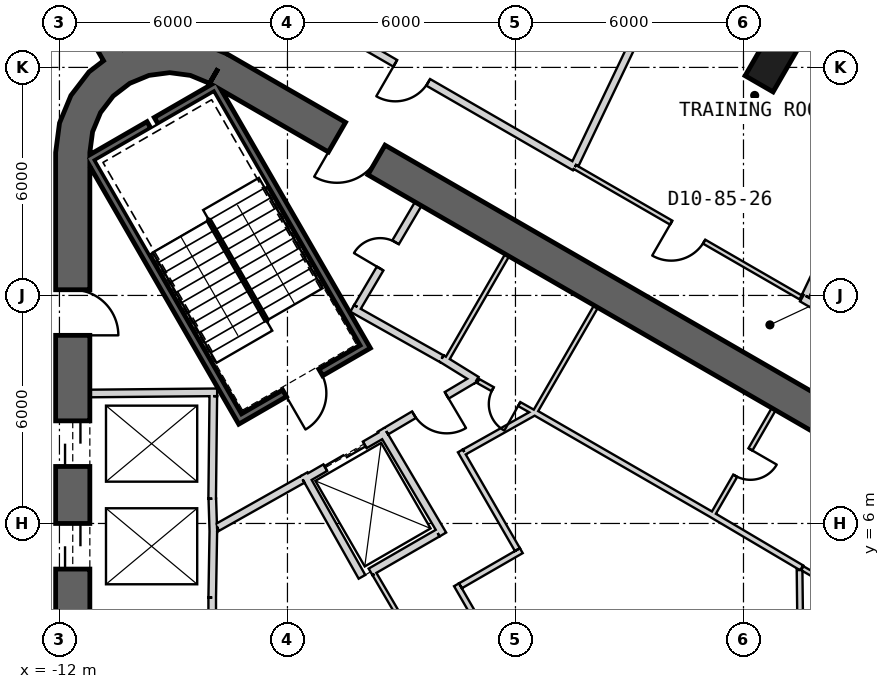
"""IFC4 building model, lengths in metres.
Left out: names, types, materials, properties, quantities, classifications, styles, units other than length and angle.
Written with IfcOpenShell. Run it as: python <this file> out.ifc"""

import sys

from ifc_helpers import new_model, si_unit, direction, frame, frame_2d, origin, origin_2d, place, context, subcontext, project, spatial, polyline, rectangle, outline, extrude, element, fill, save


model = new_model("IFC4")
c1 = context("Model", 3, precision=1e-05, world=origin(), true_north=direction((0.0, 1.0)))
c2 = subcontext(c1, "Body", "Model", "MODEL_VIEW")
j1 = project(units=[si_unit("LENGTHUNIT", "METRE"), si_unit("PLANEANGLEUNIT", "RADIAN")], contexts=[c1])
p1 = place(None, origin())
s1 = spatial("IfcSite", under=j1, at=p1, CompositionType="ELEMENT")
p2 = place(p1, origin())
s2 = spatial("IfcBuilding", under=s1, at=p2, CompositionType="ELEMENT")
p3 = place(p2, frame((0.0, 0.0, 368.9)))
s3 = spatial("IfcBuildingStorey", under=s2, at=p3, CompositionType="ELEMENT", Elevation=368.9)
p4 = place(p3, frame((6.761, 18.174, 0.0), z_axis=(0.0, 0.0, 1.0), x_axis=(0.5, 0.866025403784, 0.0)))
e1 = element("IfcColumn", 1, at=p4, inside=s3, PredefinedType="COLUMN", context=c2, shape_type="SweptSolid", body=[
    extrude(rectangle(XDim=1.4, YDim=0.85, at=origin_2d()), origin(), (0.0, 0.0, 1.0), 3.9),
])
p5 = place(p3, frame((19.475, 2.208, 0.0), z_axis=(0.0, 0.0, 1.0), x_axis=(-0.866028369851, 0.499994862586, 0.0)))
e2 = element("IfcWall", 2, at=p5, inside=s3, PredefinedType="SHEAR", context=c2, shape_type="SweptSolid", body=[
    extrude(rectangle(XDim=31.523, YDim=0.9, at=frame_2d((15.762, 0.0))), origin(), (0.0, 0.0, 1.0), 3.9),
])
p6 = place(p5, frame((7.062, 0.0, 0.0)))
e3 = element("IfcOpeningElement", 3, at=p6, cuts=e2, PredefinedType="OPENING", context=c2, shape_type="SweptSolid", body=[
    extrude(rectangle(XDim=1.2, YDim=2.4, at=frame_2d((0.6, 1.2))), frame((0.0, 0.46, 0.0), z_axis=(0.0, -1.0, 0.0), x_axis=(1.0, 0.0, 0.0)), (0.0, 0.0, 1.0), 0.92),
])
p7 = place(p5, frame((3.612, 0.0, 0.0)))
e4 = element("IfcOpeningElement", 4, at=p7, cuts=e2, PredefinedType="OPENING", context=c2, shape_type="SweptSolid", body=[
    extrude(rectangle(XDim=1.2, YDim=2.4, at=frame_2d((0.6, 1.2))), frame((0.0, 0.46, 0.0), z_axis=(0.0, -1.0, 0.0), x_axis=(1.0, 0.0, 0.0)), (0.0, 0.0, 1.0), 0.92),
])
p8 = place(p5, frame((26.712, 0.0, 0.0)))
e5 = element("IfcOpeningElement", 5, at=p8, cuts=e2, PredefinedType="OPENING", context=c2, shape_type="SweptSolid", body=[
    extrude(rectangle(XDim=1.2, YDim=2.4, at=frame_2d((0.6, 1.2))), frame((0.0, 0.46, 0.0), z_axis=(0.0, -1.0, 0.0), x_axis=(1.0, 0.0, 0.0)), (0.0, 0.0, 1.0), 0.92),
])
p9 = place(p3, frame((-11.65, 15.762, 0.0), z_axis=(0.0, 0.0, 1.0), x_axis=(0.0, -1.0, 0.0)))
e6 = element("IfcWall", 6, at=p9, inside=s3, PredefinedType="SHEAR", context=c2, shape_type="SweptSolid", body=[
    extrude(rectangle(XDim=31.523, YDim=0.9, at=frame_2d((15.762, 0.0))), origin(), (0.0, 0.0, 1.0), 3.9),
])
p10 = place(p9, frame((7.062, 0.0, 0.0)))
e7 = element("IfcOpeningElement", 7, at=p10, cuts=e6, PredefinedType="OPENING", context=c2, shape_type="SweptSolid", body=[
    extrude(rectangle(XDim=1.2, YDim=2.4, at=frame_2d((0.6, 1.2))), frame((0.0, 0.46, 0.0), z_axis=(0.0, -1.0, 0.0), x_axis=(1.0, 0.0, 0.0)), (0.0, 0.0, 1.0), 0.92),
])
p11 = place(p9, frame((9.762, 0.0, 0.0)))
e8 = element("IfcOpeningElement", 8, at=p11, cuts=e6, PredefinedType="OPENING", context=c2, shape_type="SweptSolid", body=[
    extrude(rectangle(XDim=1.2, YDim=2.4, at=frame_2d((0.6, 1.2))), frame((0.0, 0.46, 0.0), z_axis=(0.0, -1.0, 0.0), x_axis=(1.0, 0.0, 0.0)), (0.0, 0.0, 1.0), 0.92),
])
p12 = place(p9, frame((12.462, 0.0, 0.0)))
e9 = element("IfcOpeningElement", 9, at=p12, cuts=e6, PredefinedType="OPENING", context=c2, shape_type="SweptSolid", body=[
    extrude(rectangle(XDim=1.2, YDim=2.4, at=frame_2d((0.6, 1.2))), frame((0.0, 0.46, 0.0), z_axis=(0.0, -1.0, 0.0), x_axis=(1.0, 0.0, 0.0)), (0.0, 0.0, 1.0), 0.92),
])
p13 = place(p9, frame((15.162, 0.0, 0.0)))
e10 = element("IfcOpeningElement", 10, at=p13, cuts=e6, PredefinedType="OPENING", context=c2, shape_type="SweptSolid", body=[
    extrude(rectangle(XDim=1.2, YDim=2.4, at=frame_2d((0.6, 1.2))), frame((0.0, 0.46, 0.0), z_axis=(0.0, -1.0, 0.0), x_axis=(1.0, 0.0, 0.0)), (0.0, 0.0, 1.0), 0.92),
])
p14 = place(p9, frame((17.862, 0.0, 0.0)))
e11 = element("IfcOpeningElement", 11, at=p14, cuts=e6, PredefinedType="OPENING", context=c2, shape_type="SweptSolid", body=[
    extrude(rectangle(XDim=1.2, YDim=2.4, at=frame_2d((0.6, 1.2))), frame((0.0, 0.46, 0.0), z_axis=(0.0, -1.0, 0.0), x_axis=(1.0, 0.0, 0.0)), (0.0, 0.0, 1.0), 0.92),
])
p15 = place(p9, frame((20.562, 0.0, 0.0)))
e12 = element("IfcOpeningElement", 12, at=p15, cuts=e6, PredefinedType="OPENING", context=c2, shape_type="SweptSolid", body=[
    extrude(rectangle(XDim=1.2, YDim=2.4, at=frame_2d((0.6, 1.2))), frame((0.0, 0.46, 0.0), z_axis=(0.0, -1.0, 0.0), x_axis=(1.0, 0.0, 0.0)), (0.0, 0.0, 1.0), 0.92),
])
p16 = place(p9, frame((23.262, 0.0, 0.0)))
e13 = element("IfcOpeningElement", 13, at=p16, cuts=e6, PredefinedType="OPENING", context=c2, shape_type="SweptSolid", body=[
    extrude(rectangle(XDim=1.2, YDim=2.4, at=frame_2d((0.6, 1.2))), frame((0.0, 0.46, 0.0), z_axis=(0.0, -1.0, 0.0), x_axis=(1.0, 0.0, 0.0)), (0.0, 0.0, 1.0), 0.92),
])
p17 = place(p9, frame((3.612, 0.0, 0.0)))
e14 = element("IfcOpeningElement", 14, at=p17, cuts=e6, PredefinedType="OPENING", context=c2, shape_type="SweptSolid", body=[
    extrude(rectangle(XDim=1.2, YDim=2.4, at=frame_2d((0.6, 1.2))), frame((0.0, 0.46, 0.0), z_axis=(0.0, -1.0, 0.0), x_axis=(1.0, 0.0, 0.0)), (0.0, 0.0, 1.0), 0.92),
])
p18 = place(p9, frame((26.712, 0.0, 0.0)))
e15 = element("IfcOpeningElement", 15, at=p18, cuts=e6, PredefinedType="OPENING", context=c2, shape_type="SweptSolid", body=[
    extrude(rectangle(XDim=1.2, YDim=2.4, at=frame_2d((0.6, 1.2))), frame((0.0, 0.46, 0.0), z_axis=(0.0, -1.0, 0.0), x_axis=(1.0, 0.0, 0.0)), (0.0, 0.0, 1.0), 0.92),
])
p19 = place(p3, origin())
e16 = element("IfcWall", 16, at=p19, inside=s3, PredefinedType="SHEAR", context=c2, shape_type="SweptSolid", body=[
    extrude(outline(polyline([(-7.6, 18.36), (-8.323, 18.659), (-9.1, 18.762), (-9.876, 18.659), (-10.6, 18.36), (-11.221, 17.883), (-11.698, 17.262), (-11.998, 16.538), (-12.1, 15.762), (-11.2, 15.762), (-11.128, 16.305), (-10.919, 16.812), (-10.585, 17.247), (-10.15, 17.58), (-9.644, 17.79), (-9.1, 17.862), (-8.556, 17.79), (-8.05, 17.58), (-7.6, 18.36)])), origin(), (0.0, 0.0, 1.0), 3.9),
])
p20 = place(p3, frame((-10.575, 18.316, 0.0), z_axis=(0.0, 0.0, 1.0), x_axis=(-0.499997253739, 0.866026989333, 0.0)))
e17 = element("IfcWall", 17, at=p20, inside=s3, PredefinedType="SHEAR", context=c2, shape_type="SweptSolid", body=[
    extrude(rectangle(XDim=6.921, YDim=0.6, at=frame_2d((3.461, 0.0))), origin(), (0.0, 0.0, 1.0), 3.9),
])
p21 = place(p20, frame((2.95, 0.0, 0.0)))
e18 = element("IfcOpeningElement", 18, at=p21, cuts=e17, PredefinedType="OPENING", context=c2, shape_type="SweptSolid", body=[
    extrude(rectangle(XDim=1.4, YDim=2.4, at=frame_2d((0.7, 1.2))), frame((0.0, 0.31, 0.0), z_axis=(0.0, -1.0, 0.0), x_axis=(1.0, 0.0, 0.0)), (0.0, 0.0, 1.0), 0.62),
])
p22 = place(p3, frame((-11.2, 9.42, 0.0), z_axis=(0.0, 0.0, 1.0), x_axis=(0.999957167047, 0.009255488683, 0.0)))
e19 = element("IfcWall", 19, at=p22, inside=s3, PredefinedType="PLUMBINGWALL", context=c2, shape_type="SweptSolid", body=[
    extrude(rectangle(XDim=3.35, YDim=0.2, at=frame_2d((1.675, 0.0))), origin(), (0.0, 0.0, 1.0), 3.6),
])
p23 = place(p3, frame((-7.951, 9.35, 0.0), z_axis=(0.0, 0.0, 1.0), x_axis=(-0.011120469654, -0.999938165666, 0.0)))
e20 = element("IfcWall", 20, at=p23, inside=s3, PredefinedType="PLUMBINGWALL", context=c2, shape_type="SweptSolid", body=[
    extrude(rectangle(XDim=2.7, YDim=0.2, at=frame_2d((1.35, 0.0))), origin(), (0.0, 0.0, 1.0), 3.6),
])
p24 = place(p3, frame((-7.977, 6.65, 0.0), z_axis=(0.0, 0.0, 1.0), x_axis=(0.030861509705, -0.999523670164, 0.0)))
e21 = element("IfcWall", 21, at=p24, inside=s3, PredefinedType="PLUMBINGWALL", context=c2, shape_type="SweptSolid", body=[
    extrude(rectangle(XDim=0.878, YDim=0.2, at=frame_2d((0.439, 0.0))), origin(), (0.0, 0.0, 1.0), 3.6),
])
p25 = place(p3, frame((-7.949, 5.895, 0.0), z_axis=(0.0, 0.0, 1.0), x_axis=(-0.012042535896, -0.999927486035, 0.0)))
e22 = element("IfcWall", 22, at=p25, inside=s3, PredefinedType="PLUMBINGWALL", context=c2, shape_type="SweptSolid", body=[
    extrude(rectangle(XDim=1.845, YDim=0.2, at=frame_2d((0.922, 0.0))), origin(), (0.0, 0.0, 1.0), 3.6),
])
p26 = place(p3, frame((-7.98, 4.05, 0.0), z_axis=(0.0, 0.0, 1.0), x_axis=(0.0, -1.0, 0.0)))
e23 = element("IfcWall", 23, at=p26, inside=s3, PredefinedType="PLUMBINGWALL", context=c2, shape_type="SweptSolid", body=[
    extrude(rectangle(XDim=8.1, YDim=0.2, at=frame_2d((4.05, 0.0))), origin(), (0.0, 0.0, 1.0), 3.6),
])
p27 = place(p3, frame((-11.245, 15.678, -0.3), z_axis=(0.0, 0.0, 1.0), x_axis=(0.499977274689, -0.866038523851, 0.0)))
e24 = element("IfcWall", 24, at=p27, inside=s3, PredefinedType="SHEAR", context=c2, shape_type="SweptSolid", body=[
    extrude(rectangle(XDim=8.1, YDim=0.2, at=frame_2d((4.05, 0.0))), origin(), (0.0, 0.0, 1.0), 3.9),
])
p28 = place(p3, frame((-7.818, 17.541, -0.3), z_axis=(0.0, 0.0, 1.0), x_axis=(-0.866088799389, -0.499890179513, 0.0)))
e25 = element("IfcWall", 25, at=p28, inside=s3, PredefinedType="SHEAR", context=c2, shape_type="SweptSolid", body=[
    extrude(rectangle(XDim=1.89, YDim=0.2, at=frame_2d((0.945, 0.0))), origin(), (0.0, 0.0, 1.0), 3.9),
])
p29 = place(p3, frame((-9.645, 16.486, -0.3), z_axis=(0.0, 0.0, 1.0), x_axis=(-0.866038843867, -0.499976720371, 0.0)))
e26 = element("IfcWall", 26, at=p29, inside=s3, PredefinedType="SHEAR", context=c2, shape_type="SweptSolid", body=[
    extrude(rectangle(XDim=1.69, YDim=0.2, at=frame_2d((0.845, 0.0))), origin(), (0.0, 0.0, 1.0), 3.9),
])
p30 = place(p3, frame((-7.854, 17.405, -0.3), z_axis=(0.0, 0.0, 1.0), x_axis=(0.499997992926, -0.866026562566, 0.0)))
e27 = element("IfcWall", 27, at=p30, inside=s3, PredefinedType="SHEAR", context=c2, shape_type="SweptSolid", body=[
    extrude(rectangle(XDim=7.9, YDim=0.2, at=frame_2d((3.95, 0.0))), origin(), (0.0, 0.0, 1.0), 3.9),
])
p31 = place(p3, frame((-7.159, 8.8, -0.3), z_axis=(0.0, 0.0, 1.0), x_axis=(0.866047807691, 0.499961193289, 0.0)))
e28 = element("IfcWall", 28, at=p31, inside=s3, PredefinedType="SHEAR", context=c2, shape_type="SweptSolid", body=[
    extrude(rectangle(XDim=3.6, YDim=0.2, at=frame_2d((1.8, 0.0))), origin(), (0.0, 0.0, 1.0), 3.9),
])
p32 = place(p31, frame((1.25, 0.0, 0.3)))
e29 = element("IfcOpeningElement", 29, at=p32, cuts=e28, PredefinedType="OPENING", context=c2, shape_type="SweptSolid", body=[
    extrude(rectangle(XDim=1.1, YDim=2.1, at=frame_2d((0.55, 1.05))), frame((0.0, 0.11, 0.0), z_axis=(0.0, -1.0, 0.0), x_axis=(1.0, 0.0, 0.0)), (0.0, 0.0, 1.0), 0.22),
])
p33 = place(p3, frame((-5.524, 7.168, 0.0), z_axis=(0.0, 0.0, 1.0), x_axis=(0.866024647952, 0.500001309137, 0.0)))
e30 = element("IfcWall", 30, at=p33, inside=s3, PredefinedType="PLUMBINGWALL", context=c2, shape_type="SweptSolid", body=[
    extrude(rectangle(XDim=2.4, YDim=0.2, at=frame_2d((1.2, 0.0))), origin(), (0.0, 0.0, 1.0), 3.6),
])
p34 = place(p33, frame((0.6, 0.0, 0.0)))
e31 = element("IfcOpeningElement", 31, at=p34, cuts=e30, PredefinedType="OPENING", context=c2, shape_type="SweptSolid", body=[
    extrude(rectangle(XDim=1.2, YDim=2.4, at=frame_2d((0.6, 1.2))), frame((0.0, 0.11, 0.0), z_axis=(0.0, -1.0, 0.0), x_axis=(1.0, 0.0, 0.0)), (0.0, 0.0, 1.0), 0.22),
])
p35 = place(p3, frame((-3.538, 8.465, 0.0), z_axis=(0.0, 0.0, 1.0), x_axis=(0.508647062354, -0.860975125052, 0.0)))
e32 = element("IfcWall", 32, at=p35, inside=s3, PredefinedType="PLUMBINGWALL", context=c2, shape_type="SweptSolid", body=[
    extrude(rectangle(XDim=3.1, YDim=0.2, at=frame_2d((1.55, 0.0))), origin(), (0.0, 0.0, 1.0), 3.6),
])
p36 = place(p3, frame((-1.979, 5.786, 0.0), z_axis=(0.0, 0.0, 1.0), x_axis=(-0.866016689309, -0.500015093611, 0.0)))
e33 = element("IfcWall", 33, at=p36, inside=s3, PredefinedType="PLUMBINGWALL", context=c2, shape_type="SweptSolid", body=[
    extrude(rectangle(XDim=2.479, YDim=0.2, at=frame_2d((1.24, 0.0))), origin(), (0.0, 0.0, 1.0), 3.6),
])
p37 = place(p3, frame((-5.562, 7.296, 0.0), z_axis=(0.0, 0.0, 1.0), x_axis=(0.49134651263, -0.870964180966, 0.0)))
e34 = element("IfcWall", 34, at=p37, inside=s3, PredefinedType="PLUMBINGWALL", context=c2, shape_type="SweptSolid", body=[
    extrude(rectangle(XDim=3.0, YDim=0.2, at=frame_2d((1.5, 0.0))), origin(), (0.0, 0.0, 1.0), 3.6),
])
p38 = place(p3, frame((5.17, 6.195, 0.0), z_axis=(0.0, 0.0, 1.0), x_axis=(0.499984717929, 0.866034226713, 0.0)))
e35 = element("IfcWall", 35, at=p38, inside=s3, PredefinedType="PARTITIONING", context=c2, shape_type="SweptSolid", body=[
    extrude(rectangle(XDim=3.25, YDim=0.12, at=frame_2d((1.625, 0.0))), origin(), (0.0, 0.0, 1.0), 3.6),
])
p39 = place(p38, frame((1.225, 0.0, 0.0)))
e36 = element("IfcOpeningElement", 36, at=p39, cuts=e35, PredefinedType="OPENING", context=c2, shape_type="SweptSolid", body=[
    extrude(rectangle(XDim=0.8, YDim=2.1, at=frame_2d((0.4, 1.05))), frame((0.0, 0.07, 0.0), z_axis=(0.0, -1.0, 0.0), x_axis=(1.0, 0.0, 0.0)), (0.0, 0.0, 1.0), 0.14),
])
p40 = place(p3, frame((8.931, 4.025, 0.0), z_axis=(0.0, 0.0, 1.0), x_axis=(-0.862666884027, 0.505772525157, 0.0)))
e37 = element("IfcWall", 37, at=p40, inside=s3, PredefinedType="PLUMBINGWALL", context=c2, shape_type="SweptSolid", body=[
    extrude(rectangle(XDim=4.372, YDim=0.15, at=frame_2d((2.186, 0.0))), origin(), (0.0, 0.0, 1.0), 3.6),
])
p41 = place(p3, frame((-0.22, 13.06, 0.0), z_axis=(0.0, 0.0, 1.0), x_axis=(-0.499984717929, -0.866034226713, 0.0)))
e38 = element("IfcWall", 38, at=p41, inside=s3, PredefinedType="PARTITIONING", context=c2, shape_type="SweptSolid", body=[
    extrude(rectangle(XDim=3.25, YDim=0.12, at=frame_2d((1.625, 0.0))), origin(), (0.0, 0.0, 1.0), 3.6),
])
p42 = place(p41, frame((1.225, 0.0, 0.0)))
e39 = element("IfcOpeningElement", 39, at=p42, cuts=e38, PredefinedType="OPENING", context=c2, shape_type="SweptSolid", body=[
    extrude(rectangle(XDim=0.8, YDim=2.1, at=frame_2d((0.4, 1.05))), frame((0.0, 0.07, 0.0), z_axis=(0.0, -1.0, 0.0), x_axis=(1.0, 0.0, 0.0)), (0.0, 0.0, 1.0), 0.14),
])
p43 = place(p3, frame((-1.941, 10.339, 0.0), z_axis=(0.0, 0.0, 1.0), x_axis=(0.850216889117, -0.526432561171, 0.0)))
e40 = element("IfcWall", 40, at=p43, inside=s3, PredefinedType="PARTITIONING", context=c2, shape_type="SweptSolid", body=[
    extrude(rectangle(XDim=1.078, YDim=0.2, at=frame_2d((0.539, 0.0))), origin(), (0.0, 0.0, 1.0), 3.6),
])
p44 = place(p3, frame((5.159, 6.236, 0.0), z_axis=(0.0, 0.0, 1.0), x_axis=(-0.868105023632, 0.496380567654, 0.0)))
e41 = element("IfcWall", 41, at=p44, inside=s3, PredefinedType="PLUMBINGWALL", context=c2, shape_type="SweptSolid", body=[
    extrude(rectangle(XDim=7.072, YDim=0.15, at=frame_2d((3.536, 0.0))), origin(), (0.0, 0.0, 1.0), 3.6),
])
p45 = place(p3, frame((-4.296, 11.659, 0.0), z_axis=(0.0, 0.0, 1.0), x_axis=(0.871534483978, -0.490334215854, 0.0)))
e42 = element("IfcWall", 42, at=p45, inside=s3, PredefinedType="PARTITIONING", context=c2, shape_type="SweptSolid", body=[
    extrude(rectangle(XDim=2.7, YDim=0.2, at=frame_2d((1.35, 0.0))), origin(), (0.0, 0.0, 1.0), 3.6),
])
p46 = place(p3, frame((-2.558, 14.409, 0.0), z_axis=(0.0, 0.0, 1.0), x_axis=(-0.508018930956, -0.861345903683, 0.0)))
e43 = element("IfcWall", 43, at=p46, inside=s3, PredefinedType="PARTITIONING", context=c2, shape_type="SweptSolid", body=[
    extrude(rectangle(XDim=3.15, YDim=0.2, at=frame_2d((1.575, 0.0))), origin(), (0.0, 0.0, 1.0), 3.6),
])
p47 = place(p46, frame((1.175, 0.0, 0.0)))
e44 = element("IfcOpeningElement", 44, at=p47, cuts=e43, PredefinedType="OPENING", context=c2, shape_type="SweptSolid", body=[
    extrude(rectangle(XDim=0.8, YDim=2.1, at=frame_2d((0.4, 1.05))), frame((0.0, 0.11, 0.0), z_axis=(0.0, -1.0, 0.0), x_axis=(1.0, 0.0, 0.0)), (0.0, 0.0, 1.0), 0.22),
])
p48 = place(p3, frame((-1.055, 9.818, 0.0), z_axis=(0.0, 0.0, 1.0), x_axis=(-0.860614334655, -0.50925726994, 0.0)))
e45 = element("IfcWall", 45, at=p48, inside=s3, PredefinedType="PARTITIONING", context=c2, shape_type="SweptSolid", body=[
    extrude(rectangle(XDim=2.726, YDim=0.2, at=frame_2d((1.363, 0.0))), origin(), (0.0, 0.0, 1.0), 3.6),
])
p49 = place(p3, frame((-5.6, 7.16, 0.0), z_axis=(0.0, 0.0, 1.0), x_axis=(-0.871363259478, -0.490638431059, 0.0)))
e46 = element("IfcWall", 46, at=p49, inside=s3, PredefinedType="PARTITIONING", context=c2, shape_type="SweptSolid", body=[
    extrude(rectangle(XDim=2.581, YDim=0.2, at=frame_2d((1.291, 0.0))), origin(), (0.0, 0.0, 1.0), 3.6),
])
p50 = place(p49, frame((0.791, 0.0, 0.0)))
e47 = element("IfcOpeningElement", 47, at=p50, cuts=e46, PredefinedType="OPENING", context=c2, shape_type="SweptSolid", body=[
    extrude(rectangle(XDim=1.0, YDim=2.1, at=frame_2d((0.5, 1.05))), frame((0.0, 0.11, 0.0), z_axis=(0.0, -1.0, 0.0), x_axis=(1.0, 0.0, 0.0)), (0.0, 0.0, 1.0), 0.22),
])
p51 = place(p3, frame((-1.994, 5.661, 0.0), z_axis=(0.0, 0.0, 1.0), x_axis=(0.494341211302, -0.869267948798, 0.0)))
e48 = element("IfcWall", 48, at=p51, inside=s3, PredefinedType="PLUMBINGWALL", context=c2, shape_type="SweptSolid", body=[
    extrude(rectangle(XDim=4.361, YDim=0.15, at=frame_2d((2.18, 0.0))), origin(), (0.0, 0.0, 1.0), 3.6),
])
p52 = place(p3, frame((-6.024, 5.183, 0.0), z_axis=(0.0, 0.0, 1.0), x_axis=(-0.860126804455, -0.510080268447, 0.0)))
e49 = element("IfcWall", 49, at=p52, inside=s3, PredefinedType="PLUMBINGWALL", context=c2, shape_type="SweptSolid", body=[
    extrude(rectangle(XDim=2.24, YDim=0.15, at=frame_2d((1.12, 0.0))), origin(), (0.0, 0.0, 1.0), 3.6),
])
p53 = place(p3, frame((-4.551, 2.482, 0.0), z_axis=(0.0, 0.0, 1.0), x_axis=(-0.499990139034, 0.866031096941, 0.0)))
e50 = element("IfcWall", 50, at=p53, inside=s3, PredefinedType="PLUMBINGWALL", context=c2, shape_type="SweptSolid", body=[
    extrude(rectangle(XDim=3.0, YDim=0.15, at=frame_2d((1.5, 0.0))), origin(), (0.0, 0.0, 1.0), 3.6),
])
p54 = place(p3, frame((13.918, 8.938, 0.0), z_axis=(0.0, 0.0, 1.0), x_axis=(-0.866024903792, 0.500000866012, 0.0)))
e51 = element("IfcWall", 51, at=p54, inside=s3, PredefinedType="PARTITIONING", context=c2, shape_type="SweptSolid", body=[
    extrude(rectangle(XDim=23.784, YDim=0.2, at=frame_2d((11.892, 0.0))), origin(), (0.0, 0.0, 1.0), 2.97),
])
p55 = place(p54, frame((11.456, 0.0, 0.0)))
e52 = element("IfcOpeningElement", 52, at=p55, cuts=e51, PredefinedType="OPENING", context=c2, shape_type="SweptSolid", body=[
    extrude(rectangle(XDim=1.0, YDim=2.1, at=frame_2d((0.5, 1.05))), frame((0.0, 0.11, 0.0), z_axis=(0.0, -1.0, 0.0), x_axis=(1.0, 0.0, 0.0)), (0.0, 0.0, 1.0), 0.22),
])
p56 = place(p32, origin())
e53 = element("IfcDoor", 53, at=p56, inside=s3, OperationType="SINGLE_SWING_RIGHT", PredefinedType="USERDEFINED", context=c2, shape_type="SweptSolid", body=[
    extrude(rectangle(XDim=1.1, YDim=2.1, at=frame_2d((0.55, 1.05))), frame((0.0, 0.025, 0.0), z_axis=(0.0, -1.0, 0.0), x_axis=(1.0, 0.0, 0.0)), (0.0, 0.0, 1.0), 0.05),
])
fill(e29, e53)
p57 = place(p50, origin())
e54 = element("IfcDoor", 54, at=p57, inside=s3, OperationType="SINGLE_SWING_RIGHT", PredefinedType="USERDEFINED", context=c2, shape_type="SweptSolid", body=[
    extrude(rectangle(XDim=1.0, YDim=2.1, at=frame_2d((0.5, 1.05))), frame((0.0, 0.025, 0.0), z_axis=(0.0, -1.0, 0.0), x_axis=(1.0, 0.0, 0.0)), (0.0, 0.0, 1.0), 0.05),
])
fill(e47, e54)
p58 = place(p34, origin())
e55 = element("IfcDoor", 55, at=p58, inside=s3, OperationType="SLIDING_TO_LEFT", PredefinedType="USERDEFINED", context=c2, shape_type="SweptSolid", body=[
    extrude(rectangle(XDim=1.2, YDim=2.4, at=frame_2d((0.6, 1.2))), frame((0.0, 0.025, 0.0), z_axis=(0.0, -1.0, 0.0), x_axis=(1.0, 0.0, 0.0)), (0.0, 0.0, 1.0), 0.05),
])
fill(e31, e55)
p59 = place(p39, origin())
e56 = element("IfcDoor", 56, at=p59, inside=s3, OperationType="SINGLE_SWING_RIGHT", PredefinedType="USERDEFINED", context=c2, shape_type="SweptSolid", body=[
    extrude(rectangle(XDim=0.8, YDim=2.1, at=frame_2d((0.4, 1.05))), frame((0.0, 0.025, 0.0), z_axis=(0.0, -1.0, 0.0), x_axis=(1.0, 0.0, 0.0)), (0.0, 0.0, 1.0), 0.05),
])
fill(e36, e56)
p60 = place(p42, origin())
e57 = element("IfcDoor", 57, at=p60, inside=s3, OperationType="SINGLE_SWING_RIGHT", PredefinedType="USERDEFINED", context=c2, shape_type="SweptSolid", body=[
    extrude(rectangle(XDim=0.8, YDim=2.1, at=frame_2d((0.4, 1.05))), frame((0.0, 0.025, 0.0), z_axis=(0.0, -1.0, 0.0), x_axis=(1.0, 0.0, 0.0)), (0.0, 0.0, 1.0), 0.05),
])
fill(e39, e57)
p61 = place(p47, origin())
e58 = element("IfcDoor", 58, at=p61, inside=s3, OperationType="SINGLE_SWING_RIGHT", PredefinedType="USERDEFINED", context=c2, shape_type="SweptSolid", body=[
    extrude(rectangle(XDim=0.8, YDim=2.1, at=frame_2d((0.4, 1.05))), frame((0.0, 0.025, 0.0), z_axis=(0.0, -1.0, 0.0), x_axis=(1.0, 0.0, 0.0)), (0.0, 0.0, 1.0), 0.05),
])
fill(e44, e58)
p62 = place(p55, origin())
e59 = element("IfcDoor", 59, at=p62, inside=s3, OperationType="SINGLE_SWING_RIGHT", PredefinedType="USERDEFINED", context=c2, shape_type="SweptSolid", body=[
    extrude(rectangle(XDim=1.0, YDim=2.1, at=frame_2d((0.5, 1.05))), frame((0.0, 0.025, 0.0), z_axis=(0.0, -1.0, 0.0), x_axis=(1.0, 0.0, 0.0)), (0.0, 0.0, 1.0), 0.05),
])
fill(e52, e59)
p63 = place(p10, origin())
e60 = element("IfcDoor", 60, at=p63, inside=s3, OperationType="SLIDING_TO_LEFT", PredefinedType="USERDEFINED", context=c2, shape_type="SweptSolid", body=[
    extrude(rectangle(XDim=1.2, YDim=2.4, at=frame_2d((0.6, 1.2))), frame((0.0, 0.025, 0.0), z_axis=(0.0, -1.0, 0.0), x_axis=(1.0, 0.0, 0.0)), (0.0, 0.0, 1.0), 0.05),
])
fill(e7, e60)
p64 = place(p11, origin())
e61 = element("IfcDoor", 61, at=p64, inside=s3, OperationType="SLIDING_TO_LEFT", PredefinedType="USERDEFINED", context=c2, shape_type="SweptSolid", body=[
    extrude(rectangle(XDim=1.2, YDim=2.4, at=frame_2d((0.6, 1.2))), frame((0.0, 0.025, 0.0), z_axis=(0.0, -1.0, 0.0), x_axis=(1.0, 0.0, 0.0)), (0.0, 0.0, 1.0), 0.05),
])
fill(e8, e61)
p65 = place(p8, origin())
e62 = element("IfcDoor", 62, at=p65, inside=s3, OperationType="SINGLE_SWING_LEFT", PredefinedType="USERDEFINED", context=c2, shape_type="SweptSolid", body=[
    extrude(rectangle(XDim=1.2, YDim=2.4, at=frame_2d((0.6, 1.2))), frame((0.0, 0.025, 0.0), z_axis=(0.0, -1.0, 0.0), x_axis=(1.0, 0.0, 0.0)), (0.0, 0.0, 1.0), 0.05),
])
fill(e5, e62)
p66 = place(p17, origin())
e63 = element("IfcDoor", 63, at=p66, inside=s3, OperationType="SINGLE_SWING_RIGHT", PredefinedType="USERDEFINED", context=c2, shape_type="SweptSolid", body=[
    extrude(rectangle(XDim=1.2, YDim=2.4, at=frame_2d((0.6, 1.2))), frame((0.0, 0.025, 0.0), z_axis=(0.0, -1.0, 0.0), x_axis=(1.0, 0.0, 0.0)), (0.0, 0.0, 1.0), 0.05),
])
fill(e14, e63)
save(model, sys.argv[1])
